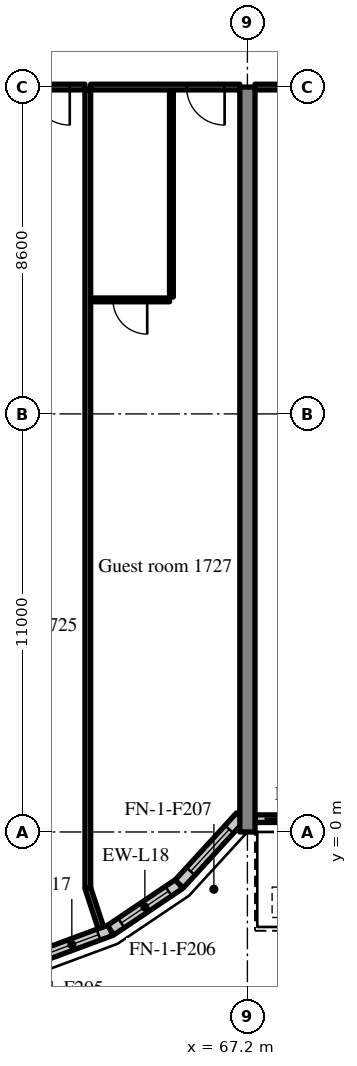
"""IFC4 building model, lengths in metres.
Left out: names, types, materials, properties, quantities, classifications, styles, units other than length and angle.
Written with IfcOpenShell. Run it as: python <this file> out.ifc"""

import sys

from ifc_helpers import new_model, si_unit, direction, frame, frame_2d, origin, place, context, subcontext, project, spatial, rectangle, extrude, source, transform, mapped, element, fill, save


model = new_model("IFC4")
c1 = context("Model", 3, precision=1e-05, world=origin(), true_north=direction((0.0, 1.0)))
c2 = subcontext(c1, "Body", "Model", "MODEL_VIEW")
j1 = project(units=[si_unit("LENGTHUNIT", "METRE"), si_unit("PLANEANGLEUNIT", "RADIAN")], contexts=[c1])
p1 = place(None, origin())
s1 = spatial("IfcSite", under=j1, at=p1, CompositionType="ELEMENT")
p2 = place(p1, origin())
s2 = spatial("IfcBuilding", under=s1, at=p2, CompositionType="ELEMENT")
p3 = place(p2, frame((0.0, 0.0, 73.4)))
s3 = spatial("IfcBuildingStorey", under=s2, at=p3, CompositionType="ELEMENT", Elevation=73.4)
m1 = source(origin(), c2, "Body", "SweptSolid", [
    extrude(rectangle(XDim=19.6, YDim=0.4, at=frame_2d((9.8, 0.0))), origin(), (0.0, 0.0, 1.0), 3.52),
])
p4 = place(p3, frame((67.2, 0.0, 0.0), z_axis=(0.0, 0.0, 1.0), x_axis=(0.0, 1.0, 0.0)))
e1 = element("IfcWall", 1, at=p4, inside=s3, PredefinedType="SHEAR", context=c2, shape_type="MappedRepresentation", body=[
    mapped(m1, transform((0.0, 0.0, 0.0), scale=1.0)),
])
m2 = source(origin(), c2, "Body", "SweptSolid", [
    extrude(rectangle(XDim=2.176, YDim=0.3, at=frame_2d((1.088, 0.0))), origin(), (0.0, 0.0, 1.0), 3.52),
])
p5 = place(p3, frame((61.56, -3.34, 0.0), z_axis=(0.0, 0.0, 1.0), x_axis=(0.937531979054, 0.347899106424, 0.0)))
e2 = element("IfcWall", 2, at=p5, inside=s3, PredefinedType="SOLIDWALL", context=c2, shape_type="MappedRepresentation", body=[
    mapped(m2, transform((0.0, 0.0, 0.0), scale=1.0)),
])
m3 = source(origin(), c2, "Body", "SweptSolid", [
    extrude(rectangle(XDim=1.5, YDim=2.0, at=frame_2d((0.75, 1.0))), frame((0.0, 0.16, 0.0), z_axis=(0.0, -1.0, 0.0), x_axis=(1.0, 0.0, 0.0)), (0.0, 0.0, 1.0), 0.32),
])
p6 = place(p5, frame((0.338, 0.0, 0.9)))
e3 = element("IfcOpeningElement", 3, at=p6, cuts=e2, PredefinedType="OPENING", context=c2, shape_type="MappedRepresentation", body=[
    mapped(m3, transform((0.0, 0.0, 0.0), scale=1.0)),
])
m4 = source(origin(), c2, "Body", "SweptSolid", [
    extrude(rectangle(XDim=2.176, YDim=0.3, at=frame_2d((1.088, 0.0))), origin(), (0.0, 0.0, 1.0), 3.52),
])
p7 = place(p3, frame((63.599, -2.583, 0.0), z_axis=(0.0, 0.0, 1.0), x_axis=(0.829625727223, 0.558319937607, 0.0)))
e4 = element("IfcWall", 4, at=p7, inside=s3, PredefinedType="SOLIDWALL", context=c2, shape_type="MappedRepresentation", body=[
    mapped(m4, transform((0.0, 0.0, 0.0), scale=1.0)),
])
p8 = place(p7, frame((0.338, 0.0, 0.9)))
e5 = element("IfcOpeningElement", 5, at=p8, cuts=e4, PredefinedType="OPENING", context=c2, shape_type="MappedRepresentation", body=[
    mapped(m3, transform((0.0, 0.0, 0.0), scale=1.0)),
])
m5 = source(origin(), c2, "Body", "SweptSolid", [
    extrude(rectangle(XDim=2.398, YDim=0.3, at=frame_2d((1.199, 0.0))), origin(), (0.0, 0.0, 1.0), 3.52),
])
p9 = place(p3, frame((65.404, -1.369, 0.0), z_axis=(0.0, 0.0, 1.0), x_axis=(0.675374189419, 0.737475222815, 0.0)))
e6 = element("IfcWall", 6, at=p9, inside=s3, PredefinedType="SOLIDWALL", context=c2, shape_type="MappedRepresentation", body=[
    mapped(m5, transform((0.0, 0.0, 0.0), scale=1.0)),
])
p10 = place(p9, frame((0.449, 0.0, 0.9)))
e7 = element("IfcOpeningElement", 7, at=p10, cuts=e6, PredefinedType="OPENING", context=c2, shape_type="MappedRepresentation", body=[
    mapped(m3, transform((0.0, 0.0, 0.0), scale=1.0)),
])
m6 = source(origin(), c2, "Body", "SweptSolid", [
    extrude(rectangle(XDim=3.6, YDim=0.2, at=frame_2d((1.8, 0.0))), origin(), (0.0, 0.0, 1.0), 2.82),
])
p11 = place(p3, frame((67.4, 0.35, 0.0), z_axis=(0.0, 0.0, 1.0), x_axis=(1.0, 0.0, 0.0)))
e8 = element("IfcWall", 8, at=p11, inside=s3, PredefinedType="SOLIDWALL", context=c2, shape_type="MappedRepresentation", body=[
    mapped(m6, transform((0.0, 0.0, 0.0), scale=1.0)),
])
m7 = source(origin(), c2, "Body", "SweptSolid", [
    extrude(rectangle(XDim=1.2, YDim=2.4, at=frame_2d((0.6, 1.2))), frame((0.0, 0.11, 0.0), z_axis=(0.0, -1.0, 0.0), x_axis=(1.0, 0.0, 0.0)), (0.0, 0.0, 1.0), 0.22),
])
p12 = place(p11, frame((0.25, 0.0, 0.0)))
e9 = element("IfcOpeningElement", 9, at=p12, cuts=e8, PredefinedType="OPENING", context=c2, shape_type="MappedRepresentation", body=[
    mapped(m7, transform((0.0, 0.0, 0.0), scale=1.0)),
])
m8 = source(origin(), c2, "Body", "SweptSolid", [
    extrude(rectangle(XDim=1.5, YDim=1.5, at=frame_2d((0.75, 0.75))), frame((0.0, 0.11, 0.0), z_axis=(0.0, -1.0, 0.0), x_axis=(1.0, 0.0, 0.0)), (0.0, 0.0, 1.0), 0.22),
])
p13 = place(p11, frame((1.85, 0.0, 0.9)))
e10 = element("IfcOpeningElement", 10, at=p13, cuts=e8, PredefinedType="OPENING", context=c2, shape_type="MappedRepresentation", body=[
    mapped(m8, transform((0.0, 0.0, 0.0), scale=1.0)),
])
m9 = source(origin(), c2, "Body", "SweptSolid", [
    extrude(rectangle(XDim=3.925, YDim=0.15, at=frame_2d((1.962, 0.0))), origin(), (0.0, 0.0, 1.0), 2.82),
])
p14 = place(p3, frame((59.0, 19.6, 0.0), z_axis=(0.0, 0.0, 1.0), x_axis=(1.0, 0.0, 0.0)))
e11 = element("IfcWall", 11, at=p14, inside=s3, PredefinedType="PARTITIONING", context=c2, shape_type="MappedRepresentation", body=[
    mapped(m9, transform((0.0, 0.0, 0.0), scale=1.0)),
])
m10 = source(origin(), c2, "Body", "SweptSolid", [
    extrude(rectangle(XDim=1.0, YDim=2.1, at=frame_2d((0.5, 1.05))), frame((0.0, 0.085, 0.0), z_axis=(0.0, -1.0, 0.0), x_axis=(1.0, 0.0, 0.0)), (0.0, 0.0, 1.0), 0.17),
])
p15 = place(p14, frame((2.525, 0.0, 0.0)))
e12 = element("IfcOpeningElement", 12, at=p15, cuts=e11, PredefinedType="OPENING", context=c2, shape_type="MappedRepresentation", body=[
    mapped(m10, transform((0.0, 0.0, 0.0), scale=1.0)),
])
m11 = source(origin(), c2, "Body", "SweptSolid", [
    extrude(rectangle(XDim=5.45, YDim=0.1, at=frame_2d((2.725, 0.0))), origin(), (0.0, 0.0, 1.0), 3.52),
])
p16 = place(p3, frame((65.2, 14.075, 0.0), z_axis=(0.0, 0.0, 1.0), x_axis=(0.0, 1.0, 0.0)))
e13 = element("IfcWall", 13, at=p16, inside=s3, PredefinedType="PARTITIONING", context=c2, shape_type="MappedRepresentation", body=[
    mapped(m11, transform((0.0, 0.0, 0.0), scale=1.0)),
])
m12 = source(origin(), c2, "Body", "SweptSolid", [
    extrude(rectangle(XDim=2.075, YDim=0.1, at=frame_2d((1.038, 0.0))), origin(), (0.0, 0.0, 1.0), 3.52),
])
p17 = place(p3, frame((63.075, 14.0, 0.0), z_axis=(0.0, 0.0, 1.0), x_axis=(1.0, 0.0, 0.0)))
e14 = element("IfcWall", 14, at=p17, inside=s3, PredefinedType="PARTITIONING", context=c2, shape_type="MappedRepresentation", body=[
    mapped(m12, transform((0.0, 0.0, 0.0), scale=1.0)),
])
m13 = source(origin(), c2, "Body", "SweptSolid", [
    extrude(rectangle(XDim=0.9, YDim=2.1, at=frame_2d((0.45, 1.05))), frame((0.0, 0.06, 0.0), z_axis=(0.0, -1.0, 0.0), x_axis=(1.0, 0.0, 0.0)), (0.0, 0.0, 1.0), 0.12),
])
p18 = place(p17, frame((0.588, 0.0, 0.0)))
e15 = element("IfcOpeningElement", 15, at=p18, cuts=e14, PredefinedType="OPENING", context=c2, shape_type="MappedRepresentation", body=[
    mapped(m13, transform((0.0, 0.0, 0.0), scale=1.0)),
])
p19 = place(p3, frame((63.075, 19.6, 0.0), z_axis=(0.0, 0.0, 1.0), x_axis=(1.0, 0.0, 0.0)))
e16 = element("IfcWall", 16, at=p19, inside=s3, PredefinedType="PARTITIONING", context=c2, shape_type="MappedRepresentation", body=[
    mapped(m9, transform((0.0, 0.0, 0.0), scale=1.0)),
])
p20 = place(p19, frame((2.525, 0.0, 0.0)))
e17 = element("IfcOpeningElement", 17, at=p20, cuts=e16, PredefinedType="OPENING", context=c2, shape_type="MappedRepresentation", body=[
    mapped(m10, transform((0.0, 0.0, 0.0), scale=1.0)),
])
m14 = source(origin(), c2, "Body", "SweptSolid", [
    extrude(rectangle(XDim=20.998, YDim=0.15, at=frame_2d((10.499, 0.0))), origin(), (0.0, 0.0, 1.0), 3.52),
])
p21 = place(p3, frame((63.0, -1.473, 0.0), z_axis=(0.0, 0.0, 1.0), x_axis=(0.0, 1.0, 0.0)))
e18 = element("IfcWall", 18, at=p21, inside=s3, PredefinedType="PARTITIONING", context=c2, shape_type="MappedRepresentation", body=[
    mapped(m14, transform((0.0, 0.0, 0.0), scale=1.0)),
])
m15 = source(origin(), c2, "Body", "SweptSolid", [
    extrude(rectangle(XDim=8.0, YDim=0.15, at=frame_2d((4.0, 0.0))), origin(), (0.0, 0.0, 1.0), 2.82),
])
p22 = place(p3, frame((67.4, 19.6, 0.0), z_axis=(0.0, 0.0, 1.0), x_axis=(1.0, 0.0, 0.0)))
e19 = element("IfcWall", 19, at=p22, inside=s3, PredefinedType="PARTITIONING", context=c2, shape_type="MappedRepresentation", body=[
    mapped(m15, transform((0.0, 0.0, 0.0), scale=1.0)),
])
m16 = source(origin(), c2, "Body", "SweptSolid", [
    extrude(rectangle(XDim=1.8, YDim=2.1, at=frame_2d((0.9, 1.05))), frame((0.0, 0.085, 0.0), z_axis=(0.0, -1.0, 0.0), x_axis=(1.0, 0.0, 0.0)), (0.0, 0.0, 1.0), 0.17),
])
p23 = place(p22, frame((3.1, 0.0, 0.0)))
e20 = element("IfcOpeningElement", 20, at=p23, cuts=e19, PredefinedType="OPENING", context=c2, shape_type="MappedRepresentation", body=[
    mapped(m16, transform((0.0, 0.0, 0.0), scale=1.0)),
])
m17 = source(origin(), c2, "Body", "SweptSolid", [
    extrude(rectangle(XDim=1.101, YDim=0.15, at=frame_2d((0.55, 0.0))), origin(), (0.0, 0.0, 1.0), 3.52),
])
p24 = place(p3, frame((63.343, -2.519, 0.0), z_axis=(0.0, 0.0, 1.0), x_axis=(-0.311567081539, 0.950224159712, 0.0)))
e21 = element("IfcWall", 21, at=p24, inside=s3, PredefinedType="PARTITIONING", context=c2, shape_type="MappedRepresentation", body=[
    mapped(m17, transform((0.0, 0.0, 0.0), scale=1.0)),
])
m18 = source(origin(), c2, "Body", "SweptSolid", [
    extrude(rectangle(XDim=1.5, YDim=2.0, at=frame_2d((0.75, 1.0))), frame((0.0, 0.03, 0.0), z_axis=(0.0, -1.0, 0.0), x_axis=(1.0, 0.0, 0.0)), (0.0, 0.0, 1.0), 0.06),
])
p25 = place(p6, origin())
e22 = element("IfcWindow", 22, at=p25, inside=s3, PartitioningType="SINGLE_PANEL", PredefinedType="WINDOW", context=c2, shape_type="MappedRepresentation", body=[
    mapped(m18, transform((0.0, 0.0, 0.0), scale=1.0)),
])
fill(e3, e22)
p26 = place(p8, origin())
e23 = element("IfcWindow", 23, at=p26, inside=s3, PartitioningType="SINGLE_PANEL", PredefinedType="WINDOW", context=c2, shape_type="MappedRepresentation", body=[
    mapped(m18, transform((0.0, 0.0, 0.0), scale=1.0)),
])
fill(e5, e23)
p27 = place(p10, origin())
e24 = element("IfcWindow", 24, at=p27, inside=s3, PartitioningType="SINGLE_PANEL", PredefinedType="WINDOW", context=c2, shape_type="MappedRepresentation", body=[
    mapped(m18, transform((0.0, 0.0, 0.0), scale=1.0)),
])
fill(e7, e24)
m19 = source(origin(), c2, "Body", "SweptSolid", [
    extrude(rectangle(XDim=1.2, YDim=2.4, at=frame_2d((0.6, 1.2))), frame((0.0, 0.025, 0.0), z_axis=(0.0, -1.0, 0.0), x_axis=(1.0, 0.0, 0.0)), (0.0, 0.0, 1.0), 0.05),
])
p28 = place(p12, origin())
e25 = element("IfcDoor", 25, at=p28, inside=s3, OperationType="SLIDING_TO_RIGHT", PredefinedType="DOOR", context=c2, shape_type="MappedRepresentation", body=[
    mapped(m19, transform((0.0, 0.0, 0.0), scale=1.0)),
])
fill(e9, e25)
m20 = source(origin(), c2, "Body", "SweptSolid", [
    extrude(rectangle(XDim=1.0, YDim=2.1, at=frame_2d((0.5, 1.05))), frame((0.0, 0.025, 0.0), z_axis=(0.0, -1.0, 0.0), x_axis=(1.0, 0.0, 0.0)), (0.0, 0.0, 1.0), 0.05),
])
p29 = place(p15, origin())
e26 = element("IfcDoor", 26, at=p29, inside=s3, OperationType="SINGLE_SWING_RIGHT", PredefinedType="DOOR", context=c2, shape_type="MappedRepresentation", body=[
    mapped(m20, transform((0.0, 0.0, 0.0), scale=1.0)),
])
fill(e12, e26)
m21 = source(origin(), c2, "Body", "SweptSolid", [
    extrude(rectangle(XDim=0.9, YDim=2.1, at=frame_2d((0.45, 1.05))), frame((0.0, 0.025, 0.0), z_axis=(0.0, -1.0, 0.0), x_axis=(1.0, 0.0, 0.0)), (0.0, 0.0, 1.0), 0.05),
])
p30 = place(p18, origin())
e27 = element("IfcDoor", 27, at=p30, inside=s3, OperationType="SINGLE_SWING_RIGHT", PredefinedType="DOOR", context=c2, shape_type="MappedRepresentation", body=[
    mapped(m21, transform((0.0, 0.0, 0.0), scale=1.0)),
])
fill(e15, e27)
p31 = place(p20, origin())
e28 = element("IfcDoor", 28, at=p31, inside=s3, OperationType="SINGLE_SWING_RIGHT", PredefinedType="DOOR", context=c2, shape_type="MappedRepresentation", body=[
    mapped(m20, transform((0.0, 0.0, 0.0), scale=1.0)),
])
fill(e17, e28)
save(model, sys.argv[1])
